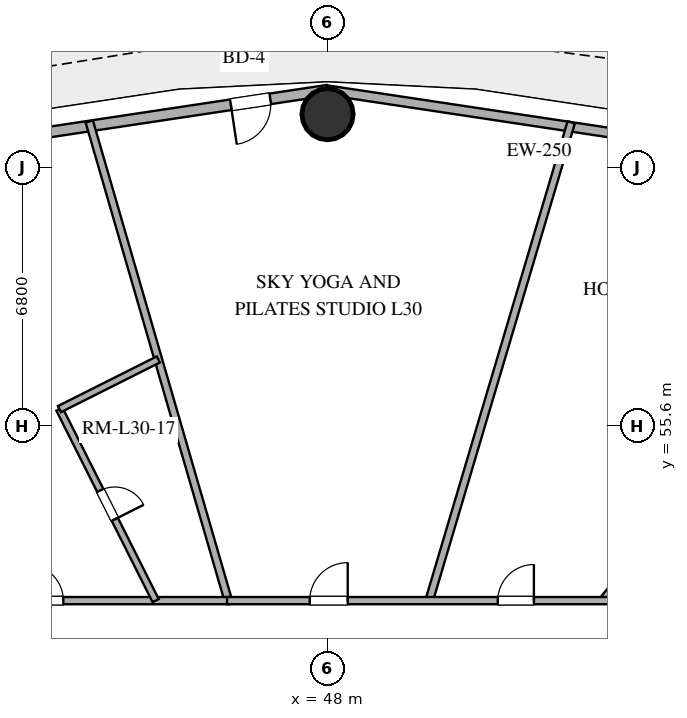
"""IFC4 building model, lengths in metres.
Left out: names, types, materials, properties, quantities, classifications, styles, units other than length and angle.
Written with IfcOpenShell. Run it as: python <this file> out.ifc"""

import sys

from ifc_helpers import new_model, si_unit, direction, frame, frame_2d, origin, origin_2d, place, context, subcontext, project, spatial, rectangle, hollow_circle, extrude, element, fill, save


model = new_model("IFC4")
c1 = context("Model", 3, precision=1e-05, world=origin(), true_north=direction((0.0, 1.0)))
c2 = subcontext(c1, "Body", "Model", "MODEL_VIEW")
j1 = project(units=[si_unit("LENGTHUNIT", "METRE"), si_unit("PLANEANGLEUNIT", "RADIAN")], contexts=[c1])
p1 = place(None, origin())
s1 = spatial("IfcSite", under=j1, at=p1, CompositionType="ELEMENT")
p2 = place(p1, origin())
s2 = spatial("IfcBuilding", under=s1, at=p2, CompositionType="ELEMENT")
p3 = place(p2, frame((0.0, 0.0, 120.0)))
s3 = spatial("IfcBuildingStorey", under=s2, at=p3, CompositionType="ELEMENT", Elevation=120.0)
p4 = place(p3, frame((48.0, 63.8, 0.0), z_axis=(0.0, 0.0, 1.0), x_axis=(1.0, 0.0, 0.0)))
e1 = element("IfcColumn", 1, at=p4, inside=s3, PredefinedType="COLUMN", context=c2, shape_type="SweptSolid", body=[
    extrude(hollow_circle(Radius=0.675, WallThickness=0.036, at=origin_2d()), origin(), (0.0, 0.0, 1.0), 3.38),
])
p5 = place(p3, frame((59.351, 62.723, 0.0), z_axis=(0.0, 0.0, 1.0), x_axis=(-0.988877774656, 0.148730450117, 0.0)))
e2 = element("IfcWall", 2, at=p5, inside=s3, PredefinedType="SOLIDWALL", context=c2, shape_type="SweptSolid", body=[
    extrude(rectangle(XDim=11.479, YDim=0.25, at=frame_2d((5.74, 0.0))), origin(), (0.0, 0.0, 1.0), 3.38),
])
p6 = place(p3, frame((48.0, 64.43, 0.0), z_axis=(0.0, 0.0, 1.0), x_axis=(-0.988877774656, -0.148730450117, 0.0)))
e3 = element("IfcWall", 3, at=p6, inside=s3, PredefinedType="SOLIDWALL", context=c2, shape_type="SweptSolid", body=[
    extrude(rectangle(XDim=11.479, YDim=0.28, at=frame_2d((5.74, 0.0))), origin(), (0.0, 0.0, 1.0), 3.38),
])
p7 = place(p6, frame((1.524, 0.0, 0.0)))
e4 = element("IfcOpeningElement", 4, at=p7, cuts=e3, PredefinedType="OPENING", context=c2, shape_type="SweptSolid", body=[
    extrude(rectangle(XDim=1.05, YDim=2.2, at=frame_2d((0.525, 1.1))), frame((0.0, 0.15, 0.0), z_axis=(0.0, -1.0, 0.0), x_axis=(1.0, 0.0, 0.0)), (0.0, 0.0, 1.0), 0.3),
])
p8 = place(p6, frame((7.5, 0.0, 0.85)))
e5 = element("IfcOpeningElement", 5, at=p8, cuts=e3, PredefinedType="OPENING", context=c2, shape_type="SweptSolid", body=[
    extrude(rectangle(XDim=1.5, YDim=1.8, at=frame_2d((0.75, 0.9))), frame((0.0, 0.15, 0.0), z_axis=(0.0, -1.0, 0.0), x_axis=(1.0, 0.0, 0.0)), (0.0, 0.0, 1.0), 0.3),
])
p9 = place(p3, frame((54.413, 63.586, 0.0), z_axis=(0.0, 0.0, 1.0), x_axis=(-0.284782789849, -0.958592073098, 0.0)))
e6 = element("IfcWall", 6, at=p9, inside=s3, PredefinedType="PARTITIONING", context=c2, shape_type="SweptSolid", body=[
    extrude(rectangle(XDim=13.129, YDim=0.2, at=frame_2d((6.565, 0.0))), origin(), (0.0, 0.0, 1.0), 2.74),
])
p10 = place(p3, frame((45.388, 51.0, 0.0), z_axis=(0.0, 0.0, 1.0), x_axis=(-0.278690680179, 0.960380916502, 0.0)))
e7 = element("IfcWall", 7, at=p10, inside=s3, PredefinedType="PARTITIONING", context=c2, shape_type="SweptSolid", body=[
    extrude(rectangle(XDim=13.127, YDim=0.2, at=frame_2d((6.563, 0.0))), origin(), (0.0, 0.0, 1.0), 2.74),
])
p11 = place(p3, frame((55.229, 51.0, 0.0), z_axis=(0.0, 0.0, 1.0), x_axis=(0.626239129839, 0.779631035977, 0.0)))
e8 = element("IfcWall", 8, at=p11, inside=s3, PredefinedType="PLUMBINGWALL", context=c2, shape_type="SweptSolid", body=[
    extrude(rectangle(XDim=6.223, YDim=0.18, at=frame_2d((3.112, 0.0))), origin(), (0.0, 0.0, 1.0), 2.74),
])
p12 = place(p11, frame((2.687, 0.0, 0.0)))
e9 = element("IfcOpeningElement", 9, at=p12, cuts=e8, PredefinedType="OPENING", context=c2, shape_type="SweptSolid", body=[
    extrude(rectangle(XDim=0.85, YDim=2.1, at=frame_2d((0.425, 1.05))), frame((0.0, 0.1, 0.0), z_axis=(0.0, -1.0, 0.0), x_axis=(1.0, 0.0, 0.0)), (0.0, 0.0, 1.0), 0.2),
])
p13 = place(p3, frame((34.8, 51.0, 0.0), z_axis=(0.0, 0.0, 1.0), x_axis=(1.0, 0.0, 0.0)))
e10 = element("IfcWall", 10, at=p13, inside=s3, PredefinedType="PARTITIONING", context=c2, shape_type="SweptSolid", body=[
    extrude(rectangle(XDim=10.622, YDim=0.19, at=frame_2d((5.311, 0.0))), origin(), (0.0, 0.0, 1.0), 2.74),
])
p14 = place(p13, frame((5.297, 0.0, 0.0)))
e11 = element("IfcOpeningElement", 11, at=p14, cuts=e10, PredefinedType="OPENING", context=c2, shape_type="SweptSolid", body=[
    extrude(rectangle(XDim=0.95, YDim=2.15, at=frame_2d((0.475, 1.075))), frame((0.0, 0.105, 0.0), z_axis=(0.0, -1.0, 0.0), x_axis=(1.0, 0.0, 0.0)), (0.0, 0.0, 1.0), 0.21),
])
p15 = place(p3, frame((40.945, 56.039, 0.0), z_axis=(0.0, 0.0, 1.0), x_axis=(0.44904833135, -0.893507468414, 0.0)))
e12 = element("IfcWall", 12, at=p15, inside=s3, PredefinedType="PLUMBINGWALL", context=c2, shape_type="SweptSolid", body=[
    extrude(rectangle(XDim=5.639, YDim=0.18, at=frame_2d((2.82, 0.0))), origin(), (0.0, 0.0, 1.0), 2.74),
])
p16 = place(p15, frame((2.395, 0.0, 0.0)))
e13 = element("IfcOpeningElement", 13, at=p16, cuts=e12, PredefinedType="OPENING", context=c2, shape_type="SweptSolid", body=[
    extrude(rectangle(XDim=0.85, YDim=2.1, at=frame_2d((0.425, 1.05))), frame((0.0, 0.1, 0.0), z_axis=(0.0, -1.0, 0.0), x_axis=(1.0, 0.0, 0.0)), (0.0, 0.0, 1.0), 0.2),
])
p17 = place(p3, frame((45.355, 51.0, 0.0), z_axis=(0.0, 0.0, 1.0), x_axis=(1.0, 0.0, 0.0)))
e14 = element("IfcWall", 14, at=p17, inside=s3, PredefinedType="PARTITIONING", context=c2, shape_type="SweptSolid", body=[
    extrude(rectangle(XDim=15.845, YDim=0.19, at=frame_2d((7.922, 0.0))), origin(), (0.0, 0.0, 1.0), 2.74),
])
p18 = place(p17, frame((2.176, 0.0, 0.0)))
e15 = element("IfcOpeningElement", 15, at=p18, cuts=e14, PredefinedType="OPENING", context=c2, shape_type="SweptSolid", body=[
    extrude(rectangle(XDim=1.0, YDim=2.2, at=frame_2d((0.5, 1.1))), frame((0.0, 0.105, 0.0), z_axis=(0.0, -1.0, 0.0), x_axis=(1.0, 0.0, 0.0)), (0.0, 0.0, 1.0), 0.21),
])
p19 = place(p17, frame((7.125, 0.0, 0.0)))
e16 = element("IfcOpeningElement", 16, at=p19, cuts=e14, PredefinedType="OPENING", context=c2, shape_type="SweptSolid", body=[
    extrude(rectangle(XDim=0.95, YDim=2.15, at=frame_2d((0.475, 1.075))), frame((0.0, 0.105, 0.0), z_axis=(0.0, -1.0, 0.0), x_axis=(1.0, 0.0, 0.0)), (0.0, 0.0, 1.0), 0.21),
])
p20 = place(p3, frame((43.547, 57.346, 0.0), z_axis=(0.0, 0.0, 1.0), x_axis=(-0.893519933294, -0.449023528122, 0.0)))
e17 = element("IfcWall", 17, at=p20, inside=s3, PredefinedType="PLUMBINGWALL", context=c2, shape_type="SweptSolid", body=[
    extrude(rectangle(XDim=2.912, YDim=0.18, at=frame_2d((1.456, 0.0))), origin(), (0.0, 0.0, 1.0), 2.74),
])
p21 = place(p7, origin())
e18 = element("IfcDoor", 18, at=p21, inside=s3, OperationType="SINGLE_SWING_RIGHT", PredefinedType="DOOR", context=c2, shape_type="SweptSolid", body=[
    extrude(rectangle(XDim=1.05, YDim=2.2, at=frame_2d((0.525, 1.1))), frame((0.0, 0.025, 0.0), z_axis=(0.0, -1.0, 0.0), x_axis=(1.0, 0.0, 0.0)), (0.0, 0.0, 1.0), 0.05),
])
fill(e4, e18)
p22 = place(p14, origin())
e19 = element("IfcDoor", 19, at=p22, inside=s3, OperationType="SINGLE_SWING_LEFT", PredefinedType="DOOR", context=c2, shape_type="SweptSolid", body=[
    extrude(rectangle(XDim=0.95, YDim=2.15, at=frame_2d((0.475, 1.075))), frame((0.0, 0.025, 0.0), z_axis=(0.0, -1.0, 0.0), x_axis=(1.0, 0.0, 0.0)), (0.0, 0.0, 1.0), 0.05),
])
fill(e11, e19)
p23 = place(p16, origin())
e20 = element("IfcDoor", 20, at=p23, inside=s3, OperationType="SINGLE_SWING_RIGHT", PredefinedType="DOOR", context=c2, shape_type="SweptSolid", body=[
    extrude(rectangle(XDim=0.85, YDim=2.1, at=frame_2d((0.425, 1.05))), frame((0.0, 0.025, 0.0), z_axis=(0.0, -1.0, 0.0), x_axis=(1.0, 0.0, 0.0)), (0.0, 0.0, 1.0), 0.05),
])
fill(e13, e20)
p24 = place(p18, origin())
e21 = element("IfcDoor", 21, at=p24, inside=s3, OperationType="SINGLE_SWING_RIGHT", PredefinedType="DOOR", context=c2, shape_type="SweptSolid", body=[
    extrude(rectangle(XDim=1.0, YDim=2.2, at=frame_2d((0.5, 1.1))), frame((0.0, 0.025, 0.0), z_axis=(0.0, -1.0, 0.0), x_axis=(1.0, 0.0, 0.0)), (0.0, 0.0, 1.0), 0.05),
])
fill(e15, e21)
p25 = place(p19, origin())
e22 = element("IfcDoor", 22, at=p25, inside=s3, OperationType="SINGLE_SWING_RIGHT", PredefinedType="DOOR", context=c2, shape_type="SweptSolid", body=[
    extrude(rectangle(XDim=0.95, YDim=2.15, at=frame_2d((0.475, 1.075))), frame((0.0, 0.025, 0.0), z_axis=(0.0, -1.0, 0.0), x_axis=(1.0, 0.0, 0.0)), (0.0, 0.0, 1.0), 0.05),
])
fill(e16, e22)
save(model, sys.argv[1])
